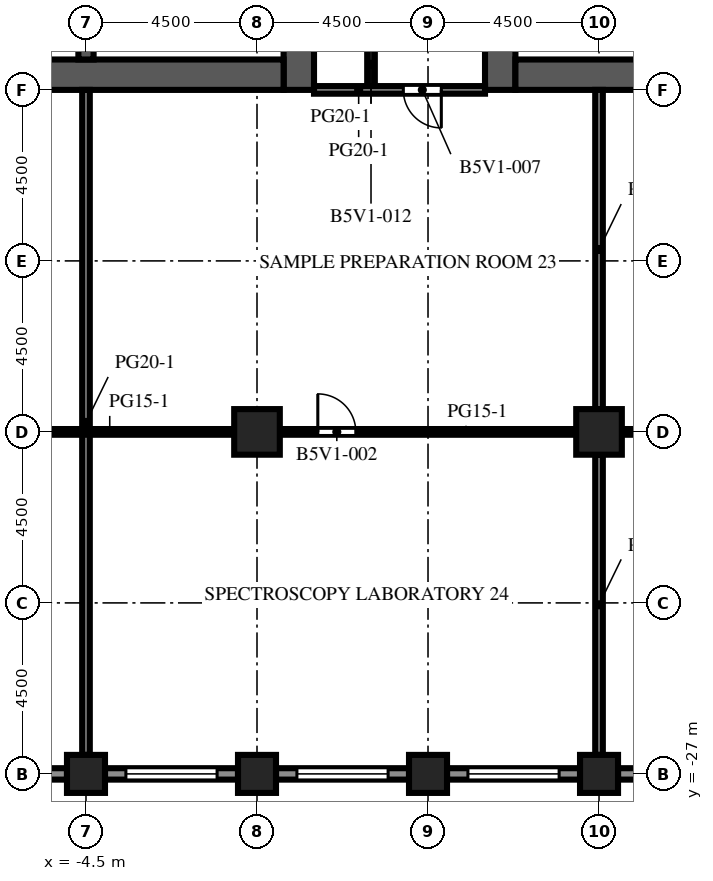
"""IFC4 building model, lengths in metres.
Left out: names, types, materials, properties, quantities, classifications, styles, units other than length and angle.
Written with IfcOpenShell. Run it as: python <this file> out.ifc"""

import sys

from ifc_helpers import new_model, si_unit, direction, frame, frame_2d, origin, origin_2d, place, context, subcontext, project, spatial, rectangle, extrude, element, fill, save


model = new_model("IFC4")
c1 = context("Model", 3, precision=1e-05, world=origin(), true_north=direction((0.0, 1.0)))
c2 = subcontext(c1, "Body", "Model", "MODEL_VIEW")
j1 = project(units=[si_unit("LENGTHUNIT", "METRE"), si_unit("PLANEANGLEUNIT", "RADIAN")], contexts=[c1])
p1 = place(None, origin())
s1 = spatial("IfcSite", under=j1, at=p1, CompositionType="ELEMENT")
p2 = place(p1, origin())
s2 = spatial("IfcBuilding", under=s1, at=p2, CompositionType="ELEMENT")
p3 = place(p2, frame((0.0, 0.0, 169.1)))
s3 = spatial("IfcBuildingStorey", under=s2, at=p3, CompositionType="ELEMENT", Elevation=169.1)
for number, where, z_axis, x_axis in (
    (1, (-4.5, -27.0, 0.0), (0.0, 0.0, 1.0), (1.0, 0.0, 0.0)),
    (2, (0.0, -27.0, 0.0), (0.0, 0.0, 1.0), (1.0, 0.0, 0.0)),
    (3, (4.5, -27.0, 0.0), (0.0, 0.0, 1.0), (1.0, 0.0, 0.0)),
    (4, (9.0, -27.0, 0.0), (0.0, 0.0, 1.0), (1.0, 0.0, 0.0)),
):
    element("IfcColumn", number, at=place(p3, frame(where, z_axis=z_axis, x_axis=x_axis)), inside=s3, PredefinedType="COLUMN", context=c2, shape_type="SweptSolid", body=[
        extrude(rectangle(XDim=1.0, YDim=1.0, at=origin_2d()), origin(), (0.0, 0.0, 1.0), 4.1),
    ])
for number, where, z_axis, x_axis in (
    (5, (0.0, -18.0, 0.0), (0.0, 0.0, 1.0), (1.0, 0.0, 0.0)),
    (6, (9.0, -18.0, 0.0), (0.0, 0.0, 1.0), (1.0, 0.0, 0.0)),
):
    element("IfcColumn", number, at=place(p3, frame(where, z_axis=z_axis, x_axis=x_axis)), inside=s3, PredefinedType="COLUMN", context=c2, shape_type="SweptSolid", body=[
        extrude(rectangle(XDim=1.2, YDim=1.2, at=origin_2d()), origin(), (0.0, 0.0, 1.0), 4.1),
    ])
p4 = place(p3, frame((1.1, -9.0, 0.0), z_axis=(0.0, 0.0, 1.0), x_axis=(0.0, 1.0, 0.0)))
e7 = element("IfcWall", 7, at=p4, inside=s3, PredefinedType="SHEAR", context=c2, shape_type="SweptSolid", body=[
    extrude(rectangle(XDim=27.5, YDim=0.8, at=frame_2d((13.75, 0.0))), origin(), (0.0, 0.0, 1.0), 4.1),
])
p5 = place(p4, frame((12.55, 0.0, 0.0)))
e8 = element("IfcOpeningElement", 8, at=p5, cuts=e7, PredefinedType="OPENING", context=c2, shape_type="SweptSolid", body=[
    extrude(rectangle(XDim=2.4, YDim=2.4, at=frame_2d((1.2, 1.2))), frame((0.0, 0.41, 0.0), z_axis=(0.0, -1.0, 0.0), x_axis=(1.0, 0.0, 0.0)), (0.0, 0.0, 1.0), 0.82),
])
p6 = place(p4, frame((3.95, 0.0, 0.0)))
e9 = element("IfcOpeningElement", 9, at=p6, cuts=e7, PredefinedType="OPENING", context=c2, shape_type="SweptSolid", body=[
    extrude(rectangle(XDim=1.2, YDim=2.1, at=frame_2d((0.6, 1.05))), frame((0.0, 0.41, 0.0), z_axis=(0.0, -1.0, 0.0), x_axis=(1.0, 0.0, 0.0)), (0.0, 0.0, 1.0), 0.82),
])
p7 = place(p4, frame((22.35, 0.0, 0.0)))
e10 = element("IfcOpeningElement", 10, at=p7, cuts=e7, PredefinedType="OPENING", context=c2, shape_type="SweptSolid", body=[
    extrude(rectangle(XDim=1.2, YDim=2.1, at=frame_2d((0.6, 1.05))), frame((0.0, 0.41, 0.0), z_axis=(0.0, -1.0, 0.0), x_axis=(1.0, 0.0, 0.0)), (0.0, 0.0, 1.0), 0.82),
])
p8 = place(p3, frame((-9.7, -8.6, 0.0), z_axis=(0.0, 0.0, 1.0), x_axis=(1.0, 0.0, 0.0)))
e11 = element("IfcWall", 11, at=p8, inside=s3, PredefinedType="SHEAR", context=c2, shape_type="SweptSolid", body=[
    extrude(rectangle(XDim=10.4, YDim=0.8, at=frame_2d((5.2, 0.0))), origin(), (0.0, 0.0, 1.0), 4.1),
])
p9 = place(p3, frame((-4.5, -8.2, 0.0), z_axis=(0.0, 0.0, 1.0), x_axis=(0.0, 1.0, 0.0)))
e12 = element("IfcWall", 12, at=p9, inside=s3, PredefinedType="SHEAR", context=c2, shape_type="SweptSolid", body=[
    extrude(rectangle(XDim=7.5, YDim=0.4, at=frame_2d((3.75, 0.0))), origin(), (0.0, 0.0, 1.0), 4.1),
])
p10 = place(p3, frame((6.4, -9.0, 0.0), z_axis=(0.0, 0.0, 1.0), x_axis=(0.0, 1.0, 0.0)))
e13 = element("IfcWall", 13, at=p10, inside=s3, PredefinedType="SHEAR", context=c2, shape_type="SweptSolid", body=[
    extrude(rectangle(XDim=27.5, YDim=0.8, at=frame_2d((13.75, 0.0))), origin(), (0.0, 0.0, 1.0), 4.1),
])
p11 = place(p10, frame((12.55, 0.0, 0.0)))
e14 = element("IfcOpeningElement", 14, at=p11, cuts=e13, PredefinedType="OPENING", context=c2, shape_type="SweptSolid", body=[
    extrude(rectangle(XDim=2.4, YDim=2.4, at=frame_2d((1.2, 1.2))), frame((0.0, 0.41, 0.0), z_axis=(0.0, -1.0, 0.0), x_axis=(1.0, 0.0, 0.0)), (0.0, 0.0, 1.0), 0.82),
])
p12 = place(p10, frame((3.95, 0.0, 0.0)))
e15 = element("IfcOpeningElement", 15, at=p12, cuts=e13, PredefinedType="OPENING", context=c2, shape_type="SweptSolid", body=[
    extrude(rectangle(XDim=1.2, YDim=2.1, at=frame_2d((0.6, 1.05))), frame((0.0, 0.41, 0.0), z_axis=(0.0, -1.0, 0.0), x_axis=(1.0, 0.0, 0.0)), (0.0, 0.0, 1.0), 0.82),
])
p13 = place(p10, frame((22.35, 0.0, 0.0)))
e16 = element("IfcOpeningElement", 16, at=p13, cuts=e13, PredefinedType="OPENING", context=c2, shape_type="SweptSolid", body=[
    extrude(rectangle(XDim=1.2, YDim=2.1, at=frame_2d((0.6, 1.05))), frame((0.0, 0.41, 0.0), z_axis=(0.0, -1.0, 0.0), x_axis=(1.0, 0.0, 0.0)), (0.0, 0.0, 1.0), 0.82),
])
p14 = place(p3, frame((6.8, -8.6, 0.0), z_axis=(0.0, 0.0, 1.0), x_axis=(1.0, 0.0, 0.0)))
e17 = element("IfcWall", 17, at=p14, inside=s3, PredefinedType="SHEAR", context=c2, shape_type="SweptSolid", body=[
    extrude(rectangle(XDim=10.4, YDim=0.8, at=frame_2d((5.2, 0.0))), origin(), (0.0, 0.0, 1.0), 4.1),
])
p15 = place(p3, frame((-5.0, -27.0, 0.0), z_axis=(0.0, 0.0, 1.0), x_axis=(-1.0, 0.0, 0.0)))
e18 = element("IfcWall", 18, at=p15, inside=s3, PredefinedType="SOLIDWALL", context=c2, shape_type="SweptSolid", body=[
    extrude(rectangle(XDim=3.5, YDim=0.3, at=frame_2d((1.75, 0.0))), origin(), (0.0, 0.0, 1.0), 2.85),
])
p16 = place(p15, frame((0.55, 0.0, 0.8)))
e19 = element("IfcOpeningElement", 19, at=p16, cuts=e18, PredefinedType="OPENING", context=c2, shape_type="SweptSolid", body=[
    extrude(rectangle(XDim=2.4, YDim=1.7, at=frame_2d((1.2, 0.85))), frame((0.0, 0.16, 0.0), z_axis=(0.0, -1.0, 0.0), x_axis=(1.0, 0.0, 0.0)), (0.0, 0.0, 1.0), 0.32),
])
p17 = place(p3, frame((-0.5, -27.0, 0.0), z_axis=(0.0, 0.0, 1.0), x_axis=(-1.0, 0.0, 0.0)))
e20 = element("IfcWall", 20, at=p17, inside=s3, PredefinedType="SOLIDWALL", context=c2, shape_type="SweptSolid", body=[
    extrude(rectangle(XDim=3.5, YDim=0.3, at=frame_2d((1.75, 0.0))), origin(), (0.0, 0.0, 1.0), 2.85),
])
p18 = place(p17, frame((0.55, 0.0, 0.8)))
e21 = element("IfcOpeningElement", 21, at=p18, cuts=e20, PredefinedType="OPENING", context=c2, shape_type="SweptSolid", body=[
    extrude(rectangle(XDim=2.4, YDim=1.7, at=frame_2d((1.2, 0.85))), frame((0.0, 0.16, 0.0), z_axis=(0.0, -1.0, 0.0), x_axis=(1.0, 0.0, 0.0)), (0.0, 0.0, 1.0), 0.32),
])
p19 = place(p3, frame((4.0, -27.0, 0.0), z_axis=(0.0, 0.0, 1.0), x_axis=(-1.0, 0.0, 0.0)))
e22 = element("IfcWall", 22, at=p19, inside=s3, PredefinedType="SOLIDWALL", context=c2, shape_type="SweptSolid", body=[
    extrude(rectangle(XDim=3.5, YDim=0.3, at=frame_2d((1.75, 0.0))), origin(), (0.0, 0.0, 1.0), 2.85),
])
p20 = place(p19, frame((0.55, 0.0, 0.8)))
e23 = element("IfcOpeningElement", 23, at=p20, cuts=e22, PredefinedType="OPENING", context=c2, shape_type="SweptSolid", body=[
    extrude(rectangle(XDim=2.4, YDim=1.7, at=frame_2d((1.2, 0.85))), frame((0.0, 0.16, 0.0), z_axis=(0.0, -1.0, 0.0), x_axis=(1.0, 0.0, 0.0)), (0.0, 0.0, 1.0), 0.32),
])
p21 = place(p3, frame((8.5, -27.0, 0.0), z_axis=(0.0, 0.0, 1.0), x_axis=(-1.0, 0.0, 0.0)))
e24 = element("IfcWall", 24, at=p21, inside=s3, PredefinedType="SOLIDWALL", context=c2, shape_type="SweptSolid", body=[
    extrude(rectangle(XDim=3.5, YDim=0.3, at=frame_2d((1.75, 0.0))), origin(), (0.0, 0.0, 1.0), 2.85),
])
p22 = place(p21, frame((0.55, 0.0, 0.8)))
e25 = element("IfcOpeningElement", 25, at=p22, cuts=e24, PredefinedType="OPENING", context=c2, shape_type="SweptSolid", body=[
    extrude(rectangle(XDim=2.4, YDim=1.7, at=frame_2d((1.2, 0.85))), frame((0.0, 0.16, 0.0), z_axis=(0.0, -1.0, 0.0), x_axis=(1.0, 0.0, 0.0)), (0.0, 0.0, 1.0), 0.32),
])
p23 = place(p3, frame((13.0, -27.0, 0.0), z_axis=(0.0, 0.0, 1.0), x_axis=(-1.0, 0.0, 0.0)))
e26 = element("IfcWall", 26, at=p23, inside=s3, PredefinedType="SOLIDWALL", context=c2, shape_type="SweptSolid", body=[
    extrude(rectangle(XDim=3.5, YDim=0.3, at=frame_2d((1.75, 0.0))), origin(), (0.0, 0.0, 1.0), 2.85),
])
p24 = place(p23, frame((0.55, 0.0, 0.8)))
e27 = element("IfcOpeningElement", 27, at=p24, cuts=e26, PredefinedType="OPENING", context=c2, shape_type="SweptSolid", body=[
    extrude(rectangle(XDim=2.4, YDim=1.7, at=frame_2d((1.2, 0.85))), frame((0.0, 0.16, 0.0), z_axis=(0.0, -1.0, 0.0), x_axis=(1.0, 0.0, 0.0)), (0.0, 0.0, 1.0), 0.32),
])
p25 = place(p3, frame((-0.8, -8.2, 0.0), z_axis=(0.0, 0.0, 1.0), x_axis=(0.0, 1.0, 0.0)))
e28 = element("IfcWall", 28, at=p25, inside=s3, PredefinedType="PARTITIONING", context=c2, shape_type="SweptSolid", body=[
    extrude(rectangle(XDim=2.55, YDim=0.1, at=frame_2d((1.275, 0.0))), origin(), (0.0, 0.0, 1.0), 3.65),
])
p26 = place(p25, frame((0.775, 0.0, 0.0)))
e29 = element("IfcOpeningElement", 29, at=p26, cuts=e28, PredefinedType="OPENING", context=c2, shape_type="SweptSolid", body=[
    extrude(rectangle(XDim=1.0, YDim=2.1, at=frame_2d((0.5, 1.05))), frame((0.0, 0.06, 0.0), z_axis=(0.0, -1.0, 0.0), x_axis=(1.0, 0.0, 0.0)), (0.0, 0.0, 1.0), 0.12),
])
p27 = place(p3, frame((8.3, -8.2, 0.0), z_axis=(0.0, 0.0, 1.0), x_axis=(0.0, 1.0, 0.0)))
e30 = element("IfcWall", 30, at=p27, inside=s3, PredefinedType="PARTITIONING", context=c2, shape_type="SweptSolid", body=[
    extrude(rectangle(XDim=2.55, YDim=0.1, at=frame_2d((1.275, 0.0))), origin(), (0.0, 0.0, 1.0), 3.65),
])
p28 = place(p27, frame((0.775, 0.0, 0.0)))
e31 = element("IfcOpeningElement", 31, at=p28, cuts=e30, PredefinedType="OPENING", context=c2, shape_type="SweptSolid", body=[
    extrude(rectangle(XDim=1.0, YDim=2.1, at=frame_2d((0.5, 1.05))), frame((0.0, 0.06, 0.0), z_axis=(0.0, -1.0, 0.0), x_axis=(1.0, 0.0, 0.0)), (0.0, 0.0, 1.0), 0.12),
])
p29 = place(p3, frame((-4.5, -26.5, 0.0), z_axis=(0.0, 0.0, 1.0), x_axis=(0.0, 1.0, 0.0)))
e32 = element("IfcWall", 32, at=p29, inside=s3, PredefinedType="PARTITIONING", context=c2, shape_type="SweptSolid", body=[
    extrude(rectangle(XDim=17.5, YDim=0.2, at=frame_2d((8.75, 0.0))), origin(), (0.0, 0.0, 1.0), 3.65),
])
p30 = place(p3, frame((3.0, -9.0, 0.0), z_axis=(0.0, 0.0, 1.0), x_axis=(0.0, 1.0, 0.0)))
e33 = element("IfcWall", 33, at=p30, inside=s3, PredefinedType="PARTITIONING", context=c2, shape_type="SweptSolid", body=[
    extrude(rectangle(XDim=3.0, YDim=0.2, at=frame_2d((1.5, 0.0))), origin(), (0.0, 0.0, 1.0), 3.65),
])
p31 = place(p30, frame((1.35, 0.0, 0.0)))
e34 = element("IfcOpeningElement", 34, at=p31, cuts=e33, PredefinedType="OPENING", context=c2, shape_type="SweptSolid", body=[
    extrude(rectangle(XDim=1.0, YDim=2.1, at=frame_2d((0.5, 1.05))), frame((0.0, 0.11, 0.0), z_axis=(0.0, -1.0, 0.0), x_axis=(1.0, 0.0, 0.0)), (0.0, 0.0, 1.0), 0.22),
])
p32 = place(p3, frame((9.0, -26.5, 0.0), z_axis=(0.0, 0.0, 1.0), x_axis=(0.0, 1.0, 0.0)))
e35 = element("IfcWall", 35, at=p32, inside=s3, PredefinedType="PARTITIONING", context=c2, shape_type="SweptSolid", body=[
    extrude(rectangle(XDim=7.9, YDim=0.2, at=frame_2d((3.95, 0.0))), origin(), (0.0, 0.0, 1.0), 3.65),
])
p33 = place(p3, frame((9.0, -17.4, 0.0), z_axis=(0.0, 0.0, 1.0), x_axis=(0.0, 1.0, 0.0)))
e36 = element("IfcWall", 36, at=p33, inside=s3, PredefinedType="PARTITIONING", context=c2, shape_type="SweptSolid", body=[
    extrude(rectangle(XDim=8.4, YDim=0.2, at=frame_2d((4.2, 0.0))), origin(), (0.0, 0.0, 1.0), 3.65),
])
p34 = place(p3, frame((-0.6, -18.0, 0.0), z_axis=(0.0, 0.0, 1.0), x_axis=(-1.0, 0.0, 0.0)))
e37 = element("IfcWall", 37, at=p34, inside=s3, PredefinedType="PARTITIONING", context=c2, shape_type="SweptSolid", body=[
    extrude(rectangle(XDim=7.8, YDim=0.15, at=frame_2d((3.9, 0.0))), origin(), (0.0, 0.0, 1.0), 3.65),
])
p35 = place(p34, frame((6.55, 0.0, 0.0)))
e38 = element("IfcOpeningElement", 38, at=p35, cuts=e37, PredefinedType="OPENING", context=c2, shape_type="SweptSolid", body=[
    extrude(rectangle(XDim=1.0, YDim=2.1, at=frame_2d((0.5, 1.05))), frame((0.0, 0.085, 0.0), z_axis=(0.0, -1.0, 0.0), x_axis=(1.0, 0.0, 0.0)), (0.0, 0.0, 1.0), 0.17),
])
p36 = place(p3, frame((8.4, -18.0, 0.0), z_axis=(0.0, 0.0, 1.0), x_axis=(-1.0, 0.0, 0.0)))
e39 = element("IfcWall", 39, at=p36, inside=s3, PredefinedType="PARTITIONING", context=c2, shape_type="SweptSolid", body=[
    extrude(rectangle(XDim=7.8, YDim=0.15, at=frame_2d((3.9, 0.0))), origin(), (0.0, 0.0, 1.0), 3.65),
])
p37 = place(p36, frame((5.8, 0.0, 0.0)))
e40 = element("IfcOpeningElement", 40, at=p37, cuts=e39, PredefinedType="OPENING", context=c2, shape_type="SweptSolid", body=[
    extrude(rectangle(XDim=1.0, YDim=2.1, at=frame_2d((0.5, 1.05))), frame((0.0, 0.085, 0.0), z_axis=(0.0, -1.0, 0.0), x_axis=(1.0, 0.0, 0.0)), (0.0, 0.0, 1.0), 0.17),
])
p38 = place(p3, frame((17.4, -18.0, 0.0), z_axis=(0.0, 0.0, 1.0), x_axis=(-1.0, 0.0, 0.0)))
e41 = element("IfcWall", 41, at=p38, inside=s3, PredefinedType="PARTITIONING", context=c2, shape_type="SweptSolid", body=[
    extrude(rectangle(XDim=7.8, YDim=0.15, at=frame_2d((3.9, 0.0))), origin(), (0.0, 0.0, 1.0), 3.65),
])
p39 = place(p38, frame((0.55, 0.0, 0.0)))
e42 = element("IfcOpeningElement", 42, at=p39, cuts=e41, PredefinedType="OPENING", context=c2, shape_type="SweptSolid", body=[
    extrude(rectangle(XDim=1.0, YDim=2.1, at=frame_2d((0.5, 1.05))), frame((0.0, 0.085, 0.0), z_axis=(0.0, -1.0, 0.0), x_axis=(1.0, 0.0, 0.0)), (0.0, 0.0, 1.0), 0.17),
])
p40 = place(p3, frame((6.0, -9.0, 0.0), z_axis=(0.0, 0.0, 1.0), x_axis=(-1.0, 0.0, 0.0)))
e43 = element("IfcWall", 43, at=p40, inside=s3, PredefinedType="PARTITIONING", context=c2, shape_type="SweptSolid", body=[
    extrude(rectangle(XDim=4.5, YDim=0.2, at=frame_2d((2.25, 0.0))), origin(), (0.0, 0.0, 1.0), 3.65),
])
p41 = place(p40, frame((1.15, 0.0, 0.0)))
e44 = element("IfcOpeningElement", 44, at=p41, cuts=e43, PredefinedType="OPENING", context=c2, shape_type="SweptSolid", body=[
    extrude(rectangle(XDim=1.0, YDim=2.1, at=frame_2d((0.5, 1.05))), frame((0.0, 0.11, 0.0), z_axis=(0.0, -1.0, 0.0), x_axis=(1.0, 0.0, 0.0)), (0.0, 0.0, 1.0), 0.22),
])
p42 = place(p18, origin())
e45 = element("IfcWindow", 45, at=p42, inside=s3, PartitioningType="SINGLE_PANEL", PredefinedType="WINDOW", context=c2, shape_type="SweptSolid", body=[
    extrude(rectangle(XDim=2.4, YDim=1.7, at=frame_2d((1.2, 0.85))), frame((0.0, 0.03, 0.0), z_axis=(0.0, -1.0, 0.0), x_axis=(1.0, 0.0, 0.0)), (0.0, 0.0, 1.0), 0.06),
])
fill(e21, e45)
p43 = place(p20, origin())
e46 = element("IfcWindow", 46, at=p43, inside=s3, PartitioningType="SINGLE_PANEL", PredefinedType="WINDOW", context=c2, shape_type="SweptSolid", body=[
    extrude(rectangle(XDim=2.4, YDim=1.7, at=frame_2d((1.2, 0.85))), frame((0.0, 0.03, 0.0), z_axis=(0.0, -1.0, 0.0), x_axis=(1.0, 0.0, 0.0)), (0.0, 0.0, 1.0), 0.06),
])
fill(e23, e46)
p44 = place(p22, origin())
e47 = element("IfcWindow", 47, at=p44, inside=s3, PartitioningType="SINGLE_PANEL", PredefinedType="WINDOW", context=c2, shape_type="SweptSolid", body=[
    extrude(rectangle(XDim=2.4, YDim=1.7, at=frame_2d((1.2, 0.85))), frame((0.0, 0.03, 0.0), z_axis=(0.0, -1.0, 0.0), x_axis=(1.0, 0.0, 0.0)), (0.0, 0.0, 1.0), 0.06),
])
fill(e25, e47)
p45 = place(p37, origin())
e48 = element("IfcDoor", 48, at=p45, inside=s3, OperationType="SINGLE_SWING_RIGHT", PredefinedType="DOOR", context=c2, shape_type="SweptSolid", body=[
    extrude(rectangle(XDim=1.0, YDim=2.1, at=frame_2d((0.5, 1.05))), frame((0.0, 0.025, 0.0), z_axis=(0.0, -1.0, 0.0), x_axis=(1.0, 0.0, 0.0)), (0.0, 0.0, 1.0), 0.05),
])
fill(e40, e48)
p46 = place(p41, origin())
e49 = element("IfcDoor", 49, at=p46, inside=s3, OperationType="SINGLE_SWING_LEFT", PredefinedType="DOOR", context=c2, shape_type="SweptSolid", body=[
    extrude(rectangle(XDim=1.0, YDim=2.1, at=frame_2d((0.5, 1.05))), frame((0.0, 0.025, 0.0), z_axis=(0.0, -1.0, 0.0), x_axis=(1.0, 0.0, 0.0)), (0.0, 0.0, 1.0), 0.05),
])
fill(e44, e49)
save(model, sys.argv[1])
